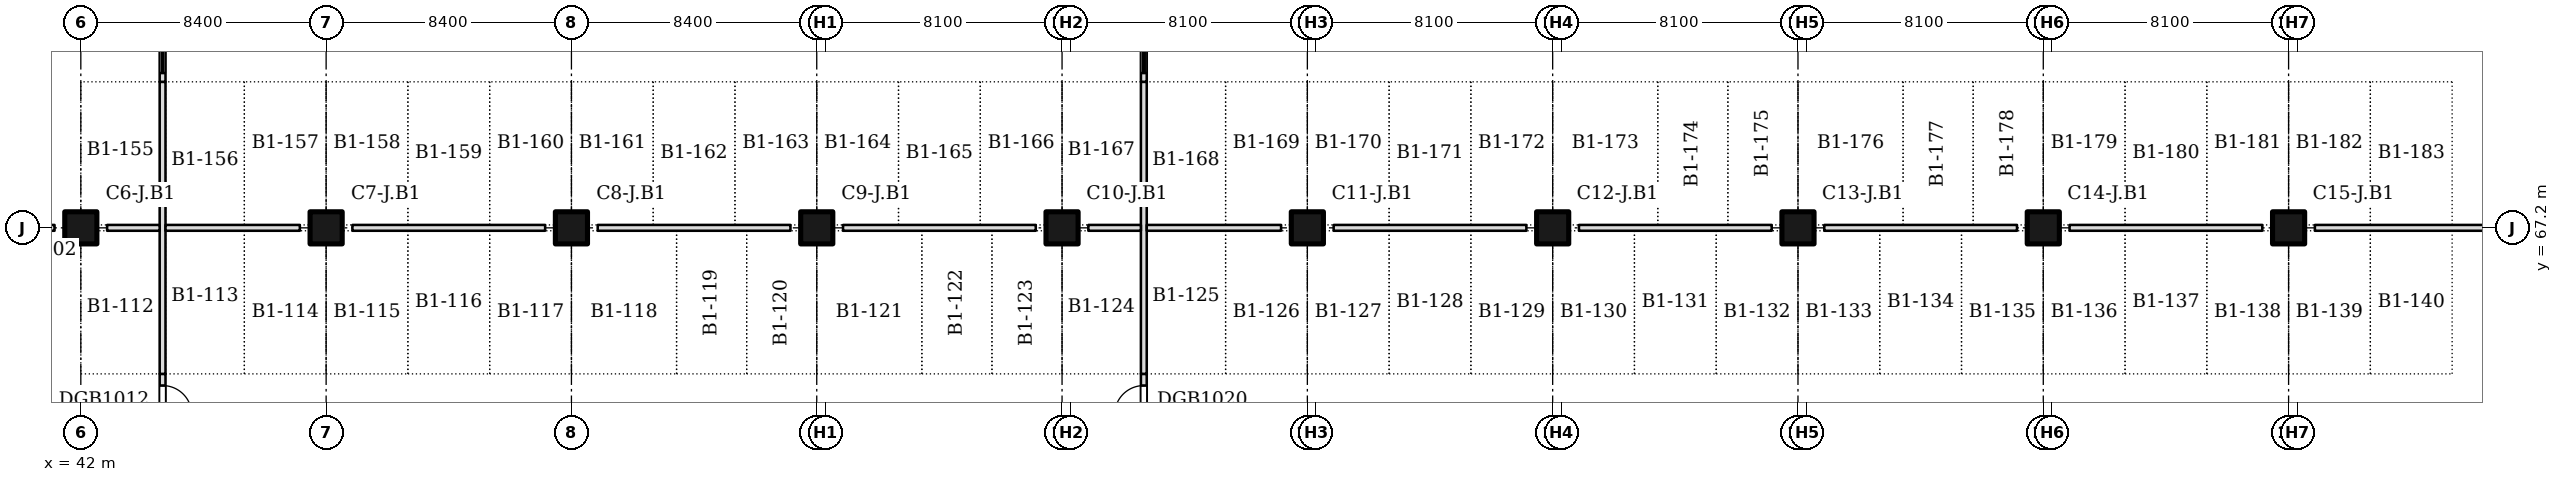
"""IFC4 building model, lengths in metres.
Left out: names, types, materials, properties, quantities, classifications, styles, units other than length and angle.
Written with IfcOpenShell. Run it as: python <this file> out.ifc"""

import sys

from ifc_helpers import new_model, si_unit, direction, frame, frame_2d, origin, origin_2d, place, context, subcontext, project, spatial, rectangle, extrude, element, fill, save


model = new_model("IFC4")
c1 = context("Model", 3, precision=1e-05, world=origin(), true_north=direction((0.0, 1.0)))
c2 = subcontext(c1, "Body", "Model", "MODEL_VIEW")
j1 = project(units=[si_unit("LENGTHUNIT", "METRE"), si_unit("PLANEANGLEUNIT", "RADIAN")], contexts=[c1])
p1 = place(None, origin())
s1 = spatial("IfcSite", under=j1, at=p1, CompositionType="ELEMENT")
p2 = place(p1, origin())
s2 = spatial("IfcBuilding", under=s1, at=p2, CompositionType="ELEMENT")
p3 = place(p2, frame((0.0, 0.0, -4.0)))
s3 = spatial("IfcBuildingStorey", under=s2, at=p3, CompositionType="ELEMENT", Elevation=-4.0)
for number, where, z_axis, x_axis in (
    (1, (42.0, 67.2, 0.0), (0.0, 0.0, 1.0), (1.0, 0.0, 0.0)),
    (2, (50.4, 67.2, 0.0), (0.0, 0.0, 1.0), (1.0, 0.0, 0.0)),
    (3, (58.8, 67.2, 0.0), (0.0, 0.0, 1.0), (1.0, 0.0, 0.0)),
    (4, (67.2, 67.2, 0.0), (0.0, 0.0, 1.0), (1.0, 0.0, 0.0)),
    (5, (75.6, 67.2, 0.0), (0.0, 0.0, 1.0), (1.0, 0.0, 0.0)),
    (6, (84.0, 67.2, 0.0), (0.0, 0.0, 1.0), (1.0, 0.0, 0.0)),
    (7, (92.4, 67.2, 0.0), (0.0, 0.0, 1.0), (1.0, 0.0, 0.0)),
    (8, (100.8, 67.2, 0.0), (0.0, 0.0, 1.0), (1.0, 0.0, 0.0)),
    (9, (109.2, 67.2, 0.0), (0.0, 0.0, 1.0), (1.0, 0.0, 0.0)),
    (10, (117.6, 67.2, 0.0), (0.0, 0.0, 1.0), (1.0, 0.0, 0.0)),
):
    element("IfcColumn", number, at=place(p3, frame(where, z_axis=z_axis, x_axis=x_axis)), inside=s3, PredefinedType="COLUMN", context=c2, shape_type="SweptSolid", body=[
        extrude(rectangle(XDim=1.1, YDim=1.1, at=origin_2d()), origin(), (0.0, 0.0, 1.0), 3.6),
    ])
p4 = place(p3, frame((44.8, 55.4, 0.0), z_axis=(0.0, 0.0, 1.0), x_axis=(0.0, 1.0, 0.0)))
e11 = element("IfcWall", 11, at=p4, inside=s3, PredefinedType="PARTITIONING", context=c2, shape_type="SweptSolid", body=[
    extrude(rectangle(XDim=6.8, YDim=0.2, at=frame_2d((3.4, 0.0))), origin(), (0.0, 0.0, 1.0), 3.6),
])
p5 = place(p4, frame((0.3, 0.0, 0.0)))
e12 = element("IfcOpeningElement", 12, at=p5, cuts=e11, PredefinedType="OPENING", context=c2, shape_type="SweptSolid", body=[
    extrude(rectangle(XDim=4.8, YDim=2.4, at=frame_2d((2.4, 1.2))), frame((0.0, 0.11, 0.0), z_axis=(0.0, -1.0, 0.0), x_axis=(1.0, 0.0, 0.0)), (0.0, 0.0, 1.0), 0.22),
])
p6 = place(p4, frame((5.4, 0.0, 0.0)))
e13 = element("IfcOpeningElement", 13, at=p6, cuts=e11, PredefinedType="OPENING", context=c2, shape_type="SweptSolid", body=[
    extrude(rectangle(XDim=1.0, YDim=2.1, at=frame_2d((0.5, 1.05))), frame((0.0, 0.11, 0.0), z_axis=(0.0, -1.0, 0.0), x_axis=(1.0, 0.0, 0.0)), (0.0, 0.0, 1.0), 0.22),
])
p7 = place(p3, frame((44.8, 62.2, 0.0), z_axis=(0.0, 0.0, 1.0), x_axis=(0.0, 1.0, 0.0)))
e14 = element("IfcWall", 14, at=p7, inside=s3, PredefinedType="PARTITIONING", context=c2, shape_type="SweptSolid", body=[
    extrude(rectangle(XDim=10.0, YDim=0.2, at=frame_2d((5.0, 0.0))), origin(), (0.0, 0.0, 1.0), 3.6),
])
p8 = place(p3, frame((44.8, 72.2, 0.0), z_axis=(0.0, 0.0, 1.0), x_axis=(0.0, 1.0, 0.0)))
e15 = element("IfcWall", 15, at=p8, inside=s3, PredefinedType="PARTITIONING", context=c2, shape_type="SweptSolid", body=[
    extrude(rectangle(XDim=6.8, YDim=0.2, at=frame_2d((3.4, 0.0))), origin(), (0.0, 0.0, 1.0), 3.6),
])
p9 = place(p8, frame((0.3, 0.0, 0.0)))
e16 = element("IfcOpeningElement", 16, at=p9, cuts=e15, PredefinedType="OPENING", context=c2, shape_type="SweptSolid", body=[
    extrude(rectangle(XDim=4.8, YDim=2.4, at=frame_2d((2.4, 1.2))), frame((0.0, 0.11, 0.0), z_axis=(0.0, -1.0, 0.0), x_axis=(1.0, 0.0, 0.0)), (0.0, 0.0, 1.0), 0.22),
])
p10 = place(p8, frame((5.4, 0.0, 0.0)))
e17 = element("IfcOpeningElement", 17, at=p10, cuts=e15, PredefinedType="OPENING", context=c2, shape_type="SweptSolid", body=[
    extrude(rectangle(XDim=1.0, YDim=2.1, at=frame_2d((0.5, 1.05))), frame((0.0, 0.11, 0.0), z_axis=(0.0, -1.0, 0.0), x_axis=(1.0, 0.0, 0.0)), (0.0, 0.0, 1.0), 0.22),
])
p11 = place(p3, frame((78.4, 55.4, 0.0), z_axis=(0.0, 0.0, 1.0), x_axis=(0.0, 1.0, 0.0)))
e18 = element("IfcWall", 18, at=p11, inside=s3, PredefinedType="PARTITIONING", context=c2, shape_type="SweptSolid", body=[
    extrude(rectangle(XDim=6.8, YDim=0.2, at=frame_2d((3.4, 0.0))), origin(), (0.0, 0.0, 1.0), 3.6),
])
p12 = place(p11, frame((0.3, 0.0, 0.0)))
e19 = element("IfcOpeningElement", 19, at=p12, cuts=e18, PredefinedType="OPENING", context=c2, shape_type="SweptSolid", body=[
    extrude(rectangle(XDim=4.8, YDim=2.4, at=frame_2d((2.4, 1.2))), frame((0.0, 0.11, 0.0), z_axis=(0.0, -1.0, 0.0), x_axis=(1.0, 0.0, 0.0)), (0.0, 0.0, 1.0), 0.22),
])
p13 = place(p11, frame((5.4, 0.0, 0.0)))
e20 = element("IfcOpeningElement", 20, at=p13, cuts=e18, PredefinedType="OPENING", context=c2, shape_type="SweptSolid", body=[
    extrude(rectangle(XDim=1.0, YDim=2.1, at=frame_2d((0.5, 1.05))), frame((0.0, 0.11, 0.0), z_axis=(0.0, -1.0, 0.0), x_axis=(1.0, 0.0, 0.0)), (0.0, 0.0, 1.0), 0.22),
])
p14 = place(p3, frame((78.4, 62.2, 0.0), z_axis=(0.0, 0.0, 1.0), x_axis=(0.0, 1.0, 0.0)))
e21 = element("IfcWall", 21, at=p14, inside=s3, PredefinedType="PARTITIONING", context=c2, shape_type="SweptSolid", body=[
    extrude(rectangle(XDim=10.0, YDim=0.2, at=frame_2d((5.0, 0.0))), origin(), (0.0, 0.0, 1.0), 3.6),
])
p15 = place(p3, frame((78.4, 72.2, 0.0), z_axis=(0.0, 0.0, 1.0), x_axis=(0.0, 1.0, 0.0)))
e22 = element("IfcWall", 22, at=p15, inside=s3, PredefinedType="PARTITIONING", context=c2, shape_type="SweptSolid", body=[
    extrude(rectangle(XDim=6.8, YDim=0.2, at=frame_2d((3.4, 0.0))), origin(), (0.0, 0.0, 1.0), 3.6),
])
p16 = place(p15, frame((0.3, 0.0, 0.0)))
e23 = element("IfcOpeningElement", 23, at=p16, cuts=e22, PredefinedType="OPENING", context=c2, shape_type="SweptSolid", body=[
    extrude(rectangle(XDim=4.8, YDim=2.4, at=frame_2d((2.4, 1.2))), frame((0.0, 0.11, 0.0), z_axis=(0.0, -1.0, 0.0), x_axis=(1.0, 0.0, 0.0)), (0.0, 0.0, 1.0), 0.22),
])
p17 = place(p15, frame((5.4, 0.0, 0.0)))
e24 = element("IfcOpeningElement", 24, at=p17, cuts=e22, PredefinedType="OPENING", context=c2, shape_type="SweptSolid", body=[
    extrude(rectangle(XDim=1.0, YDim=2.1, at=frame_2d((0.5, 1.05))), frame((0.0, 0.11, 0.0), z_axis=(0.0, -1.0, 0.0), x_axis=(1.0, 0.0, 0.0)), (0.0, 0.0, 1.0), 0.22),
])
p18 = place(p3, frame((34.5, 67.2, 0.0), z_axis=(0.0, 0.0, 1.0), x_axis=(1.0, 0.0, 0.0)))
e25 = element("IfcWall", 25, at=p18, inside=s3, PredefinedType="PARTITIONING", context=c2, shape_type="SweptSolid", body=[
    extrude(rectangle(XDim=6.6, YDim=0.2, at=frame_2d((3.3, 0.0))), origin(), (0.0, 0.0, 1.0), 3.6),
])
p19 = place(p18, frame((0.3, 0.0, 0.0)))
e26 = element("IfcOpeningElement", 26, at=p19, cuts=e25, PredefinedType="OPENING", context=c2, shape_type="SweptSolid", body=[
    extrude(rectangle(XDim=4.8, YDim=2.4, at=frame_2d((2.4, 1.2))), frame((0.0, 0.11, 0.0), z_axis=(0.0, -1.0, 0.0), x_axis=(1.0, 0.0, 0.0)), (0.0, 0.0, 1.0), 0.22),
])
p20 = place(p18, frame((5.3, 0.0, 0.0)))
e27 = element("IfcOpeningElement", 27, at=p20, cuts=e25, PredefinedType="OPENING", context=c2, shape_type="SweptSolid", body=[
    extrude(rectangle(XDim=1.0, YDim=2.1, at=frame_2d((0.5, 1.05))), frame((0.0, 0.11, 0.0), z_axis=(0.0, -1.0, 0.0), x_axis=(1.0, 0.0, 0.0)), (0.0, 0.0, 1.0), 0.22),
])
p21 = place(p3, frame((42.9, 67.2, 0.0), z_axis=(0.0, 0.0, 1.0), x_axis=(1.0, 0.0, 0.0)))
e28 = element("IfcWall", 28, at=p21, inside=s3, PredefinedType="PARTITIONING", context=c2, shape_type="SweptSolid", body=[
    extrude(rectangle(XDim=1.8, YDim=0.2, at=frame_2d((0.9, 0.0))), origin(), (0.0, 0.0, 1.0), 3.6),
])
p22 = place(p3, frame((44.9, 67.2, 0.0), z_axis=(0.0, 0.0, 1.0), x_axis=(1.0, 0.0, 0.0)))
e29 = element("IfcWall", 29, at=p22, inside=s3, PredefinedType="PARTITIONING", context=c2, shape_type="SweptSolid", body=[
    extrude(rectangle(XDim=4.6, YDim=0.2, at=frame_2d((2.3, 0.0))), origin(), (0.0, 0.0, 1.0), 3.6),
])
p23 = place(p3, frame((51.3, 67.2, 0.0), z_axis=(0.0, 0.0, 1.0), x_axis=(1.0, 0.0, 0.0)))
e30 = element("IfcWall", 30, at=p23, inside=s3, PredefinedType="PARTITIONING", context=c2, shape_type="SweptSolid", body=[
    extrude(rectangle(XDim=6.6, YDim=0.2, at=frame_2d((3.3, 0.0))), origin(), (0.0, 0.0, 1.0), 3.6),
])
p24 = place(p3, frame((59.7, 67.2, 0.0), z_axis=(0.0, 0.0, 1.0), x_axis=(1.0, 0.0, 0.0)))
e31 = element("IfcWall", 31, at=p24, inside=s3, PredefinedType="PARTITIONING", context=c2, shape_type="SweptSolid", body=[
    extrude(rectangle(XDim=6.6, YDim=0.2, at=frame_2d((3.3, 0.0))), origin(), (0.0, 0.0, 1.0), 3.6),
])
p25 = place(p3, frame((68.1, 67.2, 0.0), z_axis=(0.0, 0.0, 1.0), x_axis=(1.0, 0.0, 0.0)))
e32 = element("IfcWall", 32, at=p25, inside=s3, PredefinedType="PARTITIONING", context=c2, shape_type="SweptSolid", body=[
    extrude(rectangle(XDim=6.6, YDim=0.2, at=frame_2d((3.3, 0.0))), origin(), (0.0, 0.0, 1.0), 3.6),
])
p26 = place(p3, frame((76.5, 67.2, 0.0), z_axis=(0.0, 0.0, 1.0), x_axis=(1.0, 0.0, 0.0)))
e33 = element("IfcWall", 33, at=p26, inside=s3, PredefinedType="PARTITIONING", context=c2, shape_type="SweptSolid", body=[
    extrude(rectangle(XDim=1.8, YDim=0.2, at=frame_2d((0.9, 0.0))), origin(), (0.0, 0.0, 1.0), 3.6),
])
p27 = place(p3, frame((78.5, 67.2, 0.0), z_axis=(0.0, 0.0, 1.0), x_axis=(1.0, 0.0, 0.0)))
e34 = element("IfcWall", 34, at=p27, inside=s3, PredefinedType="PARTITIONING", context=c2, shape_type="SweptSolid", body=[
    extrude(rectangle(XDim=4.6, YDim=0.2, at=frame_2d((2.3, 0.0))), origin(), (0.0, 0.0, 1.0), 3.6),
])
p28 = place(p3, frame((84.9, 67.2, 0.0), z_axis=(0.0, 0.0, 1.0), x_axis=(1.0, 0.0, 0.0)))
e35 = element("IfcWall", 35, at=p28, inside=s3, PredefinedType="PARTITIONING", context=c2, shape_type="SweptSolid", body=[
    extrude(rectangle(XDim=6.6, YDim=0.2, at=frame_2d((3.3, 0.0))), origin(), (0.0, 0.0, 1.0), 3.6),
])
p29 = place(p3, frame((93.3, 67.2, 0.0), z_axis=(0.0, 0.0, 1.0), x_axis=(1.0, 0.0, 0.0)))
e36 = element("IfcWall", 36, at=p29, inside=s3, PredefinedType="PARTITIONING", context=c2, shape_type="SweptSolid", body=[
    extrude(rectangle(XDim=6.6, YDim=0.2, at=frame_2d((3.3, 0.0))), origin(), (0.0, 0.0, 1.0), 3.6),
])
p30 = place(p3, frame((101.7, 67.2, 0.0), z_axis=(0.0, 0.0, 1.0), x_axis=(1.0, 0.0, 0.0)))
e37 = element("IfcWall", 37, at=p30, inside=s3, PredefinedType="PARTITIONING", context=c2, shape_type="SweptSolid", body=[
    extrude(rectangle(XDim=6.6, YDim=0.2, at=frame_2d((3.3, 0.0))), origin(), (0.0, 0.0, 1.0), 3.6),
])
p31 = place(p3, frame((110.1, 67.2, 0.0), z_axis=(0.0, 0.0, 1.0), x_axis=(1.0, 0.0, 0.0)))
e38 = element("IfcWall", 38, at=p31, inside=s3, PredefinedType="PARTITIONING", context=c2, shape_type="SweptSolid", body=[
    extrude(rectangle(XDim=6.6, YDim=0.2, at=frame_2d((3.3, 0.0))), origin(), (0.0, 0.0, 1.0), 3.6),
])
p32 = place(p3, frame((118.5, 67.2, 0.0), z_axis=(0.0, 0.0, 1.0), x_axis=(1.0, 0.0, 0.0)))
e39 = element("IfcWall", 39, at=p32, inside=s3, PredefinedType="PARTITIONING", context=c2, shape_type="SweptSolid", body=[
    extrude(rectangle(XDim=6.6, YDim=0.2, at=frame_2d((3.3, 0.0))), origin(), (0.0, 0.0, 1.0), 3.6),
])
p33 = place(p6, frame((1.0, 0.0, 0.0), z_axis=(0.0, 0.0, 1.0), x_axis=(-1.0, 0.0, 0.0)))
e40 = element("IfcDoor", 40, at=p33, inside=s3, OperationType="SINGLE_SWING_RIGHT", PredefinedType="DOOR", context=c2, shape_type="SweptSolid", body=[
    extrude(rectangle(XDim=1.0, YDim=2.1, at=frame_2d((0.5, 1.05))), frame((0.0, 0.025, 0.0), z_axis=(0.0, -1.0, 0.0), x_axis=(1.0, 0.0, 0.0)), (0.0, 0.0, 1.0), 0.05),
])
fill(e13, e40)
p34 = place(p9, origin())
e41 = element("IfcDoor", 41, at=p34, inside=s3, OperationType="ROLLINGUP", PredefinedType="GATE", context=c2, shape_type="SweptSolid", body=[
    extrude(rectangle(XDim=4.8, YDim=2.4, at=frame_2d((2.4, 1.2))), frame((0.0, 0.025, 0.0), z_axis=(0.0, -1.0, 0.0), x_axis=(1.0, 0.0, 0.0)), (0.0, 0.0, 1.0), 0.05),
])
fill(e16, e41)
p35 = place(p13, origin())
e42 = element("IfcDoor", 42, at=p35, inside=s3, OperationType="SINGLE_SWING_LEFT", PredefinedType="DOOR", context=c2, shape_type="SweptSolid", body=[
    extrude(rectangle(XDim=1.0, YDim=2.1, at=frame_2d((0.5, 1.05))), frame((0.0, 0.025, 0.0), z_axis=(0.0, -1.0, 0.0), x_axis=(1.0, 0.0, 0.0)), (0.0, 0.0, 1.0), 0.05),
])
fill(e20, e42)
p36 = place(p16, origin())
e43 = element("IfcDoor", 43, at=p36, inside=s3, OperationType="ROLLINGUP", PredefinedType="GATE", context=c2, shape_type="SweptSolid", body=[
    extrude(rectangle(XDim=4.8, YDim=2.4, at=frame_2d((2.4, 1.2))), frame((0.0, 0.025, 0.0), z_axis=(0.0, -1.0, 0.0), x_axis=(1.0, 0.0, 0.0)), (0.0, 0.0, 1.0), 0.05),
])
fill(e23, e43)
save(model, sys.argv[1])
